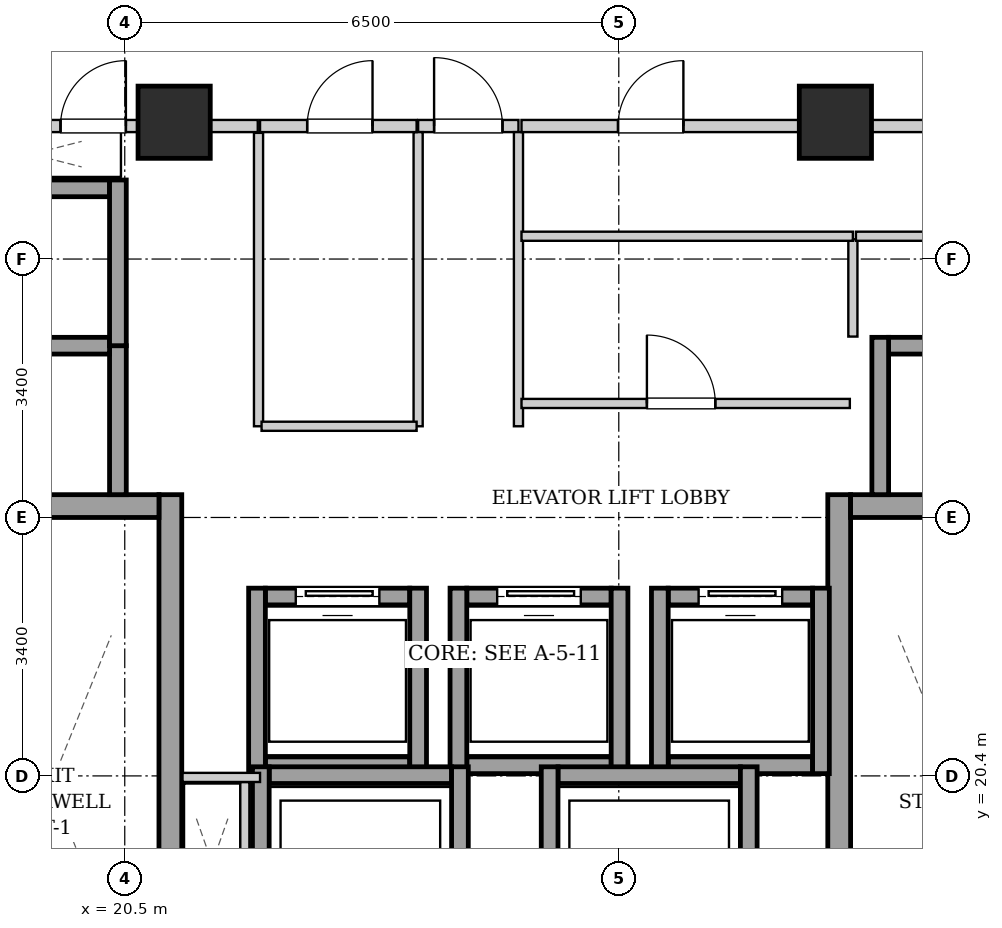
"""IFC4 building model, lengths in metres.
Left out: names, types, materials, properties, quantities, classifications, styles, units other than length and angle.
Written with IfcOpenShell. Run it as: python <this file> out.ifc"""

import sys

from ifc_helpers import new_model, si_unit, direction, frame, frame_2d, origin, origin_2d, place, context, subcontext, project, spatial, rectangle, extrude, element, fill, save


model = new_model("IFC4")
c1 = context("Model", 3, precision=1e-05, world=origin(), true_north=direction((0.0, 1.0)))
c2 = subcontext(c1, "Body", "Model", "MODEL_VIEW")
j1 = project(units=[si_unit("LENGTHUNIT", "METRE"), si_unit("PLANEANGLEUNIT", "RADIAN")], contexts=[c1])
p1 = place(None, origin())
s1 = spatial("IfcSite", under=j1, at=p1, CompositionType="ELEMENT")
p2 = place(p1, origin())
s2 = spatial("IfcBuilding", under=s1, at=p2, CompositionType="ELEMENT")
p3 = place(p2, frame((0.0, 0.0, 137.4)))
s3 = spatial("IfcBuildingStorey", under=s2, at=p3, CompositionType="ELEMENT", Elevation=137.4)
for number, where, z_axis, x_axis in (
    (1, (21.15, 29.0, 0.0), (0.0, 0.0, 1.0), (1.0, 0.0, 0.0)),
    (2, (29.85, 29.0, 0.0), (0.0, 0.0, 1.0), (1.0, 0.0, 0.0)),
):
    element("IfcColumn", number, at=place(p3, frame(where, z_axis=z_axis, x_axis=x_axis)), inside=s3, PredefinedType="COLUMN", context=c2, shape_type="SweptSolid", body=[
        extrude(rectangle(XDim=0.95, YDim=0.95, at=origin_2d()), origin(), (0.0, 0.0, 1.0), 3.25),
    ])
p4 = place(p3, frame((21.1, 15.1, 0.0), z_axis=(0.0, 0.0, 1.0), x_axis=(0.0, 1.0, 0.0)))
e3 = element("IfcWall", 3, at=p4, inside=s3, PredefinedType="SHEAR", context=c2, shape_type="SweptSolid", body=[
    extrude(rectangle(XDim=9.0, YDim=0.3, at=frame_2d((4.5, 0.0))), origin(), (0.0, 0.0, 1.0), 2.99),
])
p5 = place(p3, frame((18.1, 23.95, 0.0), z_axis=(0.0, 0.0, 1.0), x_axis=(1.0, 0.0, 0.0)))
e4 = element("IfcWall", 4, at=p5, inside=s3, PredefinedType="SHEAR", context=c2, shape_type="SweptSolid", body=[
    extrude(rectangle(XDim=2.85, YDim=0.3, at=frame_2d((1.425, 0.0))), origin(), (0.0, 0.0, 1.0), 2.99),
])
p6 = place(p3, frame((29.9, 15.1, 0.0), z_axis=(0.0, 0.0, 1.0), x_axis=(0.0, 1.0, 0.0)))
e5 = element("IfcWall", 5, at=p6, inside=s3, PredefinedType="SHEAR", context=c2, shape_type="SweptSolid", body=[
    extrude(rectangle(XDim=9.0, YDim=0.3, at=frame_2d((4.5, 0.0))), origin(), (0.0, 0.0, 1.0), 2.99),
])
p7 = place(p3, frame((30.05, 23.95, 0.0), z_axis=(0.0, 0.0, 1.0), x_axis=(1.0, 0.0, 0.0)))
e6 = element("IfcWall", 6, at=p7, inside=s3, PredefinedType="SHEAR", context=c2, shape_type="SweptSolid", body=[
    extrude(rectangle(XDim=2.85, YDim=0.3, at=frame_2d((1.425, 0.0))), origin(), (0.0, 0.0, 1.0), 2.99),
])
p8 = place(p3, frame((22.35, 20.54, 0.0), z_axis=(0.0, 0.0, 1.0), x_axis=(1.0, 0.0, 0.0)))
e7 = element("IfcWall", 7, at=p8, inside=s3, PredefinedType="SHEAR", context=c2, shape_type="SweptSolid", body=[
    extrude(rectangle(XDim=1.9, YDim=0.22, at=frame_2d((0.95, 0.0))), origin(), (0.0, 0.0, 1.0), 2.99),
])
p9 = place(p3, frame((22.35, 22.76, 0.0), z_axis=(0.0, 0.0, 1.0), x_axis=(1.0, 0.0, 0.0)))
e8 = element("IfcWall", 8, at=p9, inside=s3, PredefinedType="SHEAR", context=c2, shape_type="SweptSolid", body=[
    extrude(rectangle(XDim=1.9, YDim=0.22, at=frame_2d((0.95, 0.0))), origin(), (0.0, 0.0, 1.0), 2.99),
])
p10 = place(p9, frame((0.4, 0.0, 0.0)))
e9 = element("IfcOpeningElement", 9, at=p10, cuts=e8, PredefinedType="OPENING", context=c2, shape_type="SweptSolid", body=[
    extrude(rectangle(XDim=1.1, YDim=2.15, at=frame_2d((0.55, 1.075))), frame((0.0, 0.12, 0.0), z_axis=(0.0, -1.0, 0.0), x_axis=(1.0, 0.0, 0.0)), (0.0, 0.0, 1.0), 0.24),
])
for number, where, z_axis, x_axis in (
    (10, (22.24, 20.43, 0.0), (0.0, 0.0, 1.0), (0.0, 1.0, 0.0)),
    (11, (24.36, 20.43, 0.0), (0.0, 0.0, 1.0), (0.0, 1.0, 0.0)),
):
    element("IfcWall", number, at=place(p3, frame(where, z_axis=z_axis, x_axis=x_axis)), inside=s3, PredefinedType="SHEAR", context=c2, shape_type="SweptSolid", body=[
        extrude(rectangle(XDim=2.44, YDim=0.22, at=frame_2d((1.22, 0.0))), origin(), (0.0, 0.0, 1.0), 2.99),
    ])
p11 = place(p3, frame((25.0, 20.54, 0.0), z_axis=(0.0, 0.0, 1.0), x_axis=(1.0, 0.0, 0.0)))
e12 = element("IfcWall", 12, at=p11, inside=s3, PredefinedType="SHEAR", context=c2, shape_type="SweptSolid", body=[
    extrude(rectangle(XDim=1.9, YDim=0.22, at=frame_2d((0.95, 0.0))), origin(), (0.0, 0.0, 1.0), 2.99),
])
p12 = place(p3, frame((25.0, 22.76, 0.0), z_axis=(0.0, 0.0, 1.0), x_axis=(1.0, 0.0, 0.0)))
e13 = element("IfcWall", 13, at=p12, inside=s3, PredefinedType="SHEAR", context=c2, shape_type="SweptSolid", body=[
    extrude(rectangle(XDim=1.9, YDim=0.22, at=frame_2d((0.95, 0.0))), origin(), (0.0, 0.0, 1.0), 2.99),
])
p13 = place(p12, frame((0.4, 0.0, 0.0)))
e14 = element("IfcOpeningElement", 14, at=p13, cuts=e13, PredefinedType="OPENING", context=c2, shape_type="SweptSolid", body=[
    extrude(rectangle(XDim=1.1, YDim=2.15, at=frame_2d((0.55, 1.075))), frame((0.0, 0.12, 0.0), z_axis=(0.0, -1.0, 0.0), x_axis=(1.0, 0.0, 0.0)), (0.0, 0.0, 1.0), 0.24),
])
for number, where, z_axis, x_axis in (
    (15, (24.89, 20.43, 0.0), (0.0, 0.0, 1.0), (0.0, 1.0, 0.0)),
    (16, (27.01, 20.43, 0.0), (0.0, 0.0, 1.0), (0.0, 1.0, 0.0)),
):
    element("IfcWall", number, at=place(p3, frame(where, z_axis=z_axis, x_axis=x_axis)), inside=s3, PredefinedType="SHEAR", context=c2, shape_type="SweptSolid", body=[
        extrude(rectangle(XDim=2.44, YDim=0.22, at=frame_2d((1.22, 0.0))), origin(), (0.0, 0.0, 1.0), 2.99),
    ])
p14 = place(p3, frame((27.65, 20.54, 0.0), z_axis=(0.0, 0.0, 1.0), x_axis=(1.0, 0.0, 0.0)))
e17 = element("IfcWall", 17, at=p14, inside=s3, PredefinedType="SHEAR", context=c2, shape_type="SweptSolid", body=[
    extrude(rectangle(XDim=1.9, YDim=0.22, at=frame_2d((0.95, 0.0))), origin(), (0.0, 0.0, 1.0), 2.99),
])
p15 = place(p3, frame((27.65, 22.76, 0.0), z_axis=(0.0, 0.0, 1.0), x_axis=(1.0, 0.0, 0.0)))
e18 = element("IfcWall", 18, at=p15, inside=s3, PredefinedType="SHEAR", context=c2, shape_type="SweptSolid", body=[
    extrude(rectangle(XDim=1.9, YDim=0.22, at=frame_2d((0.95, 0.0))), origin(), (0.0, 0.0, 1.0), 2.99),
])
p16 = place(p15, frame((0.4, 0.0, 0.0)))
e19 = element("IfcOpeningElement", 19, at=p16, cuts=e18, PredefinedType="OPENING", context=c2, shape_type="SweptSolid", body=[
    extrude(rectangle(XDim=1.1, YDim=2.15, at=frame_2d((0.55, 1.075))), frame((0.0, 0.12, 0.0), z_axis=(0.0, -1.0, 0.0), x_axis=(1.0, 0.0, 0.0)), (0.0, 0.0, 1.0), 0.24),
])
for number, where, z_axis, x_axis in (
    (20, (27.54, 20.43, 0.0), (0.0, 0.0, 1.0), (0.0, 1.0, 0.0)),
    (21, (29.66, 20.43, 0.0), (0.0, 0.0, 1.0), (0.0, 1.0, 0.0)),
):
    element("IfcWall", number, at=place(p3, frame(where, z_axis=z_axis, x_axis=x_axis)), inside=s3, PredefinedType="SHEAR", context=c2, shape_type="SweptSolid", body=[
        extrude(rectangle(XDim=2.44, YDim=0.22, at=frame_2d((1.22, 0.0))), origin(), (0.0, 0.0, 1.0), 2.99),
    ])
p17 = place(p3, frame((20.41, 24.1, 0.0), z_axis=(0.0, 0.0, 1.0), x_axis=(0.0, 1.0, 0.0)))
e22 = element("IfcWall", 22, at=p17, inside=s3, PredefinedType="SHEAR", context=c2, shape_type="SweptSolid", body=[
    extrude(rectangle(XDim=1.96, YDim=0.22, at=frame_2d((0.98, 0.0))), origin(), (0.0, 0.0, 1.0), 2.99),
])
for number, where, z_axis, x_axis in (
    (23, (18.4, 26.06, 0.0), (0.0, 0.0, 1.0), (1.0, 0.0, 0.0)),
    (24, (18.4, 28.13, 0.0), (0.0, 0.0, 1.0), (1.0, 0.0, 0.0)),
):
    element("IfcWall", number, at=place(p3, frame(where, z_axis=z_axis, x_axis=x_axis)), inside=s3, PredefinedType="SHEAR", context=c2, shape_type="SweptSolid", body=[
        extrude(rectangle(XDim=1.9, YDim=0.22, at=frame_2d((0.95, 0.0))), origin(), (0.0, 0.0, 1.0), 2.99),
    ])
p18 = place(p3, frame((20.41, 26.06, 0.0), z_axis=(0.0, 0.0, 1.0), x_axis=(0.0, 1.0, 0.0)))
e25 = element("IfcWall", 25, at=p18, inside=s3, PredefinedType="SHEAR", context=c2, shape_type="SweptSolid", body=[
    extrude(rectangle(XDim=2.18, YDim=0.22, at=frame_2d((1.09, 0.0))), origin(), (0.0, 0.0, 1.0), 2.99),
])
p19 = place(p3, frame((30.55, 26.06, 0.0), z_axis=(0.0, 0.0, 1.0), x_axis=(1.0, 0.0, 0.0)))
e26 = element("IfcWall", 26, at=p19, inside=s3, PredefinedType="SHEAR", context=c2, shape_type="SweptSolid", body=[
    extrude(rectangle(XDim=1.9, YDim=0.22, at=frame_2d((0.95, 0.0))), origin(), (0.0, 0.0, 1.0), 2.99),
])
p20 = place(p3, frame((30.44, 24.1, 0.0), z_axis=(0.0, 0.0, 1.0), x_axis=(0.0, 1.0, 0.0)))
e27 = element("IfcWall", 27, at=p20, inside=s3, PredefinedType="SHEAR", context=c2, shape_type="SweptSolid", body=[
    extrude(rectangle(XDim=2.07, YDim=0.22, at=frame_2d((1.035, 0.0))), origin(), (0.0, 0.0, 1.0), 2.99),
])
p21 = place(p3, frame((22.4, 20.41, 0.0), z_axis=(0.0, 0.0, 1.0), x_axis=(1.0, 0.0, 0.0)))
e28 = element("IfcWall", 28, at=p21, inside=s3, PredefinedType="SHEAR", context=c2, shape_type="SweptSolid", body=[
    extrude(rectangle(XDim=2.4, YDim=0.22, at=frame_2d((1.2, 0.0))), origin(), (0.0, 0.0, 1.0), 2.99),
])
for number, where, z_axis, x_axis in (
    (29, (22.29, 17.98, 0.0), (0.0, 0.0, 1.0), (0.0, 1.0, 0.0)),
    (30, (24.91, 17.98, 0.0), (0.0, 0.0, 1.0), (0.0, 1.0, 0.0)),
):
    element("IfcWall", number, at=place(p3, frame(where, z_axis=z_axis, x_axis=x_axis)), inside=s3, PredefinedType="SHEAR", context=c2, shape_type="SweptSolid", body=[
        extrude(rectangle(XDim=2.54, YDim=0.22, at=frame_2d((1.27, 0.0))), origin(), (0.0, 0.0, 1.0), 2.99),
    ])
p22 = place(p3, frame((26.2, 20.41, 0.0), z_axis=(0.0, 0.0, 1.0), x_axis=(1.0, 0.0, 0.0)))
e31 = element("IfcWall", 31, at=p22, inside=s3, PredefinedType="SHEAR", context=c2, shape_type="SweptSolid", body=[
    extrude(rectangle(XDim=2.4, YDim=0.22, at=frame_2d((1.2, 0.0))), origin(), (0.0, 0.0, 1.0), 2.99),
])
for number, where, z_axis, x_axis in (
    (32, (26.09, 17.98, 0.0), (0.0, 0.0, 1.0), (0.0, 1.0, 0.0)),
    (33, (28.71, 17.98, 0.0), (0.0, 0.0, 1.0), (0.0, 1.0, 0.0)),
):
    element("IfcWall", number, at=place(p3, frame(where, z_axis=z_axis, x_axis=x_axis)), inside=s3, PredefinedType="SHEAR", context=c2, shape_type="SweptSolid", body=[
        extrude(rectangle(XDim=2.54, YDim=0.22, at=frame_2d((1.27, 0.0))), origin(), (0.0, 0.0, 1.0), 2.99),
    ])
p23 = place(p3, frame((24.36, 28.95, 0.0), z_axis=(0.0, 0.0, 1.0), x_axis=(1.0, 0.0, 0.0)))
e34 = element("IfcWall", 34, at=p23, inside=s3, PredefinedType="PARTITIONING", context=c2, shape_type="SweptSolid", body=[
    extrude(rectangle(XDim=1.32, YDim=0.16, at=frame_2d((0.66, 0.0))), origin(), (0.0, 0.0, 1.0), 2.426),
])
p24 = place(p23, frame((0.21, 0.0, 0.0)))
e35 = element("IfcOpeningElement", 35, at=p24, cuts=e34, PredefinedType="OPENING", context=c2, shape_type="SweptSolid", body=[
    extrude(rectangle(XDim=0.9, YDim=2.05, at=frame_2d((0.45, 1.025))), frame((0.0, 0.09, 0.0), z_axis=(0.0, -1.0, 0.0), x_axis=(1.0, 0.0, 0.0)), (0.0, 0.0, 1.0), 0.18),
])
p25 = place(p3, frame((17.96, 28.95, 0.0), z_axis=(0.0, 0.0, 1.0), x_axis=(1.0, 0.0, 0.0)))
e36 = element("IfcWall", 36, at=p25, inside=s3, PredefinedType="PARTITIONING", context=c2, shape_type="SweptSolid", body=[
    extrude(rectangle(XDim=4.29, YDim=0.16, at=frame_2d((2.145, 0.0))), origin(), (0.0, 0.0, 1.0), 2.426),
])
p26 = place(p25, frame((1.695, 0.0, 0.0)))
e37 = element("IfcOpeningElement", 37, at=p26, cuts=e36, PredefinedType="OPENING", context=c2, shape_type="SweptSolid", body=[
    extrude(rectangle(XDim=0.86, YDim=2.05, at=frame_2d((0.43, 1.025))), frame((0.0, 0.09, 0.0), z_axis=(0.0, -1.0, 0.0), x_axis=(1.0, 0.0, 0.0)), (0.0, 0.0, 1.0), 0.18),
])
p27 = place(p3, frame((22.08, 18.2, 0.0), z_axis=(0.0, 0.0, 1.0), x_axis=(0.0, 1.0, 0.0)))
e38 = element("IfcWall", 38, at=p27, inside=s3, PredefinedType="PARTITIONING", context=c2, shape_type="SweptSolid", body=[
    extrude(rectangle(XDim=2.12, YDim=0.12, at=frame_2d((1.06, 0.0))), origin(), (0.0, 0.0, 1.0), 2.99),
])
p28 = place(p3, frame((22.28, 20.38, 0.0), z_axis=(0.0, 0.0, 1.0), x_axis=(-1.0, 0.0, 0.0)))
e39 = element("IfcWall", 39, at=p28, inside=s3, PredefinedType="PARTITIONING", context=c2, shape_type="SweptSolid", body=[
    extrude(rectangle(XDim=1.02, YDim=0.12, at=frame_2d((0.51, 0.0))), origin(), (0.0, 0.0, 1.0), 2.99),
])
for number, where, z_axis, x_axis in (
    (40, (24.36, 25.0, 0.0), (0.0, 0.0, 1.0), (0.0, 1.0, 0.0)),
    (41, (25.68, 25.0, 0.0), (0.0, 0.0, 1.0), (0.0, 1.0, 0.0)),
):
    element("IfcWall", number, at=place(p3, frame(where, z_axis=z_axis, x_axis=x_axis)), inside=s3, PredefinedType="PARTITIONING", context=c2, shape_type="SweptSolid", body=[
        extrude(rectangle(XDim=3.87, YDim=0.12, at=frame_2d((1.935, 0.0))), origin(), (0.0, 0.0, 1.0), 2.99),
    ])
p29 = place(p3, frame((30.08, 26.18, 0.0), z_axis=(0.0, 0.0, 1.0), x_axis=(0.0, 1.0, 0.0)))
e42 = element("IfcWall", 42, at=p29, inside=s3, PredefinedType="PARTITIONING", context=c2, shape_type="SweptSolid", body=[
    extrude(rectangle(XDim=1.28, YDim=0.12, at=frame_2d((0.64, 0.0))), origin(), (0.0, 0.0, 1.0), 2.99),
])
p30 = place(p3, frame((30.12, 27.5, 0.0), z_axis=(0.0, 0.0, 1.0), x_axis=(1.0, 0.0, 0.0)))
e43 = element("IfcWall", 43, at=p30, inside=s3, PredefinedType="PARTITIONING", context=c2, shape_type="SweptSolid", body=[
    extrude(rectangle(XDim=2.92, YDim=0.12, at=frame_2d((1.46, 0.0))), origin(), (0.0, 0.0, 1.0), 2.99),
])
p31 = place(p30, frame((0.97, 0.0, 0.0)))
e44 = element("IfcOpeningElement", 44, at=p31, cuts=e43, PredefinedType="OPENING", context=c2, shape_type="SweptSolid", body=[
    extrude(rectangle(XDim=0.86, YDim=2.05, at=frame_2d((0.43, 1.025))), frame((0.0, 0.07, 0.0), z_axis=(0.0, -1.0, 0.0), x_axis=(1.0, 0.0, 0.0)), (0.0, 0.0, 1.0), 0.14),
])
p32 = place(p3, frame((22.26, 25.0, 0.0), z_axis=(0.0, 0.0, 1.0), x_axis=(0.0, 1.0, 0.0)))
e45 = element("IfcWall", 45, at=p32, inside=s3, PredefinedType="PARTITIONING", context=c2, shape_type="SweptSolid", body=[
    extrude(rectangle(XDim=3.86, YDim=0.12, at=frame_2d((1.93, 0.0))), origin(), (0.0, 0.0, 1.0), 2.99),
])
p33 = place(p3, frame((22.3, 25.0, 0.0), z_axis=(0.0, 0.0, 1.0), x_axis=(1.0, 0.0, 0.0)))
e46 = element("IfcWall", 46, at=p33, inside=s3, PredefinedType="PARTITIONING", context=c2, shape_type="SweptSolid", body=[
    extrude(rectangle(XDim=2.04, YDim=0.12, at=frame_2d((1.02, 0.0))), origin(), (0.0, 0.0, 1.0), 2.99),
])
p34 = place(p3, frame((22.28, 28.95, 0.0), z_axis=(0.0, 0.0, 1.0), x_axis=(1.0, 0.0, 0.0)))
e47 = element("IfcWall", 47, at=p34, inside=s3, PredefinedType="PARTITIONING", context=c2, shape_type="SweptSolid", body=[
    extrude(rectangle(XDim=2.06, YDim=0.16, at=frame_2d((1.03, 0.0))), origin(), (0.0, 0.0, 1.0), 2.426),
])
p35 = place(p34, frame((0.62, 0.0, 0.0)))
e48 = element("IfcOpeningElement", 48, at=p35, cuts=e47, PredefinedType="OPENING", context=c2, shape_type="SweptSolid", body=[
    extrude(rectangle(XDim=0.86, YDim=2.05, at=frame_2d((0.43, 1.025))), frame((0.0, 0.09, 0.0), z_axis=(0.0, -1.0, 0.0), x_axis=(1.0, 0.0, 0.0)), (0.0, 0.0, 1.0), 0.18),
])
p36 = place(p3, frame((25.72, 27.5, 0.0), z_axis=(0.0, 0.0, 1.0), x_axis=(1.0, 0.0, 0.0)))
e49 = element("IfcWall", 49, at=p36, inside=s3, PredefinedType="PARTITIONING", context=c2, shape_type="SweptSolid", body=[
    extrude(rectangle(XDim=4.36, YDim=0.12, at=frame_2d((2.18, 0.0))), origin(), (0.0, 0.0, 1.0), 2.99),
])
p37 = place(p3, frame((25.72, 25.3, 0.0), z_axis=(0.0, 0.0, 1.0), x_axis=(1.0, 0.0, 0.0)))
e50 = element("IfcWall", 50, at=p37, inside=s3, PredefinedType="PARTITIONING", context=c2, shape_type="SweptSolid", body=[
    extrude(rectangle(XDim=4.32, YDim=0.12, at=frame_2d((2.16, 0.0))), origin(), (0.0, 0.0, 1.0), 2.99),
])
p38 = place(p37, frame((1.65, 0.0, 0.0)))
e51 = element("IfcOpeningElement", 51, at=p38, cuts=e50, PredefinedType="OPENING", context=c2, shape_type="SweptSolid", body=[
    extrude(rectangle(XDim=0.9, YDim=2.05, at=frame_2d((0.45, 1.025))), frame((0.0, 0.07, 0.0), z_axis=(0.0, -1.0, 0.0), x_axis=(1.0, 0.0, 0.0)), (0.0, 0.0, 1.0), 0.14),
])
p39 = place(p3, frame((25.72, 28.95, 0.0), z_axis=(0.0, 0.0, 1.0), x_axis=(1.0, 0.0, 0.0)))
e52 = element("IfcWall", 52, at=p39, inside=s3, PredefinedType="PARTITIONING", context=c2, shape_type="SweptSolid", body=[
    extrude(rectangle(XDim=7.32, YDim=0.16, at=frame_2d((3.66, 0.0))), origin(), (0.0, 0.0, 1.0), 2.426),
])
p40 = place(p39, frame((1.27, 0.0, 0.0)))
e53 = element("IfcOpeningElement", 53, at=p40, cuts=e52, PredefinedType="OPENING", context=c2, shape_type="SweptSolid", body=[
    extrude(rectangle(XDim=0.86, YDim=2.05, at=frame_2d((0.43, 1.025))), frame((0.0, 0.09, 0.0), z_axis=(0.0, -1.0, 0.0), x_axis=(1.0, 0.0, 0.0)), (0.0, 0.0, 1.0), 0.18),
])
p41 = place(p10, origin())
e54 = element("IfcDoor", 54, at=p41, inside=s3, OperationType="SLIDING_TO_LEFT", PredefinedType="DOOR", context=c2, shape_type="SweptSolid", body=[
    extrude(rectangle(XDim=1.1, YDim=2.15, at=frame_2d((0.55, 1.075))), frame((0.0, 0.025, 0.0), z_axis=(0.0, -1.0, 0.0), x_axis=(1.0, 0.0, 0.0)), (0.0, 0.0, 1.0), 0.05),
])
fill(e9, e54)
p42 = place(p13, origin())
e55 = element("IfcDoor", 55, at=p42, inside=s3, OperationType="SLIDING_TO_LEFT", PredefinedType="DOOR", context=c2, shape_type="SweptSolid", body=[
    extrude(rectangle(XDim=1.1, YDim=2.15, at=frame_2d((0.55, 1.075))), frame((0.0, 0.025, 0.0), z_axis=(0.0, -1.0, 0.0), x_axis=(1.0, 0.0, 0.0)), (0.0, 0.0, 1.0), 0.05),
])
fill(e14, e55)
p43 = place(p16, origin())
e56 = element("IfcDoor", 56, at=p43, inside=s3, OperationType="SLIDING_TO_LEFT", PredefinedType="DOOR", context=c2, shape_type="SweptSolid", body=[
    extrude(rectangle(XDim=1.1, YDim=2.15, at=frame_2d((0.55, 1.075))), frame((0.0, 0.025, 0.0), z_axis=(0.0, -1.0, 0.0), x_axis=(1.0, 0.0, 0.0)), (0.0, 0.0, 1.0), 0.05),
])
fill(e19, e56)
p44 = place(p24, origin())
e57 = element("IfcDoor", 57, at=p44, inside=s3, OperationType="SINGLE_SWING_LEFT", PredefinedType="DOOR", context=c2, shape_type="SweptSolid", body=[
    extrude(rectangle(XDim=0.9, YDim=2.05, at=frame_2d((0.45, 1.025))), frame((0.0, 0.025, 0.0), z_axis=(0.0, -1.0, 0.0), x_axis=(1.0, 0.0, 0.0)), (0.0, 0.0, 1.0), 0.05),
])
fill(e35, e57)
p45 = place(p26, origin())
e58 = element("IfcDoor", 58, at=p45, inside=s3, OperationType="SINGLE_SWING_RIGHT", PredefinedType="DOOR", context=c2, shape_type="SweptSolid", body=[
    extrude(rectangle(XDim=0.86, YDim=2.05, at=frame_2d((0.43, 1.025))), frame((0.0, 0.025, 0.0), z_axis=(0.0, -1.0, 0.0), x_axis=(1.0, 0.0, 0.0)), (0.0, 0.0, 1.0), 0.05),
])
fill(e37, e58)
p46 = place(p35, origin())
e59 = element("IfcDoor", 59, at=p46, inside=s3, OperationType="SINGLE_SWING_RIGHT", PredefinedType="DOOR", context=c2, shape_type="SweptSolid", body=[
    extrude(rectangle(XDim=0.86, YDim=2.05, at=frame_2d((0.43, 1.025))), frame((0.0, 0.025, 0.0), z_axis=(0.0, -1.0, 0.0), x_axis=(1.0, 0.0, 0.0)), (0.0, 0.0, 1.0), 0.05),
])
fill(e48, e59)
p47 = place(p38, origin())
e60 = element("IfcDoor", 60, at=p47, inside=s3, OperationType="SINGLE_SWING_LEFT", PredefinedType="DOOR", context=c2, shape_type="SweptSolid", body=[
    extrude(rectangle(XDim=0.9, YDim=2.05, at=frame_2d((0.45, 1.025))), frame((0.0, 0.025, 0.0), z_axis=(0.0, -1.0, 0.0), x_axis=(1.0, 0.0, 0.0)), (0.0, 0.0, 1.0), 0.05),
])
fill(e51, e60)
p48 = place(p40, origin())
e61 = element("IfcDoor", 61, at=p48, inside=s3, OperationType="SINGLE_SWING_RIGHT", PredefinedType="DOOR", context=c2, shape_type="SweptSolid", body=[
    extrude(rectangle(XDim=0.86, YDim=2.05, at=frame_2d((0.43, 1.025))), frame((0.0, 0.025, 0.0), z_axis=(0.0, -1.0, 0.0), x_axis=(1.0, 0.0, 0.0)), (0.0, 0.0, 1.0), 0.05),
])
fill(e53, e61)
save(model, sys.argv[1])
